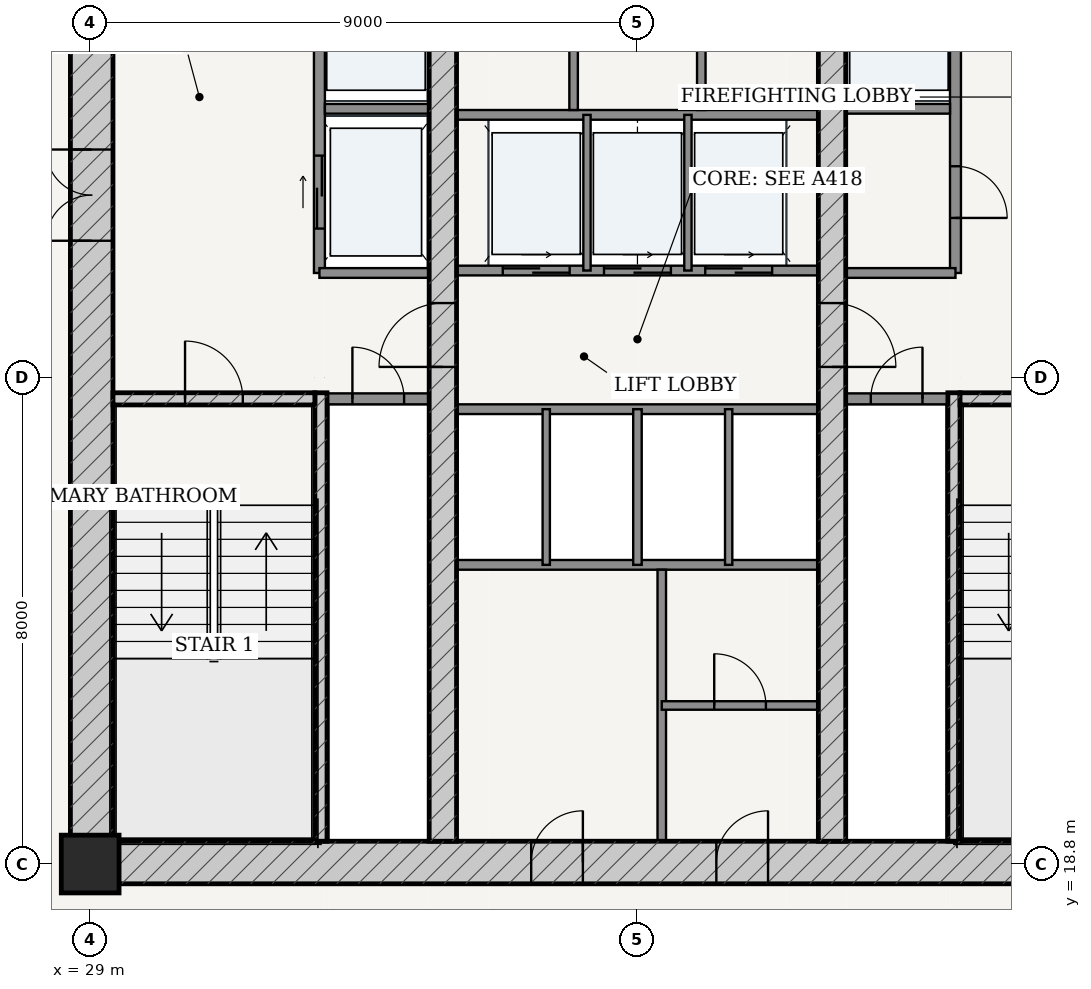
"""IFC4 building model, lengths in metres.
Left out: names, types, materials, properties, quantities, classifications, styles, units other than length and angle.
Written with IfcOpenShell. Run it as: python <this file> out.ifc"""

import sys

from ifc_helpers import new_model, si_unit, direction, frame, frame_2d, origin, origin_2d, place, context, subcontext, project, spatial, rectangle, extrude, source, transform, mapped, element, fill, save


model = new_model("IFC4")
c1 = context("Model", 3, precision=1e-05, world=origin(), true_north=direction((-0.2419218956, 0.970295726276)))
c2 = subcontext(c1, "Body", "Model", "MODEL_VIEW")
j1 = project(units=[si_unit("LENGTHUNIT", "METRE"), si_unit("PLANEANGLEUNIT", "RADIAN")], contexts=[c1])
p1 = place(None, origin())
s1 = spatial("IfcSite", under=j1, at=p1, CompositionType="ELEMENT")
p2 = place(p1, origin())
s2 = spatial("IfcBuilding", under=s1, at=p2, CompositionType="ELEMENT")
p3 = place(p2, frame((0.0, 0.0, 112.2)))
s3 = spatial("IfcBuildingStorey", under=s2, at=p3, CompositionType="ELEMENT", Elevation=112.2)
p4 = place(p3, frame((29.0, 18.8, 0.0), z_axis=(0.0, 0.0, 1.0), x_axis=(1.0, 0.0, 0.0)))
e1 = element("IfcColumn", 1, at=p4, inside=s3, PredefinedType="COLUMN", context=c2, shape_type="SweptSolid", body=[
    extrude(rectangle(XDim=0.95, YDim=0.95, at=origin_2d()), origin(), (0.0, 0.0, 1.0), 3.6),
])
p5 = place(p3, frame((28.675, 18.825, 0.0), z_axis=(0.0, 0.0, 1.0), x_axis=(1.0, 0.0, 0.0)))
e2 = element("IfcWall", 2, at=p5, inside=s3, PredefinedType="SHEAR", context=c2, shape_type="SweptSolid", body=[
    extrude(rectangle(XDim=18.65, YDim=0.7, at=frame_2d((9.325, 0.0))), origin(), (0.0, 0.0, 1.0), 3.325),
])
p6 = place(p5, frame((7.577, 0.0, 0.0)))
e3 = element("IfcOpeningElement", 3, at=p6, cuts=e2, PredefinedType="OPENING", context=c2, shape_type="SweptSolid", body=[
    extrude(rectangle(XDim=0.85, YDim=2.1, at=frame_2d((0.425, 1.05))), frame((0.0, 0.36, 0.0), z_axis=(0.0, -1.0, 0.0), x_axis=(1.0, 0.0, 0.0)), (0.0, 0.0, 1.0), 0.72),
])
p7 = place(p5, frame((10.623, 0.0, 0.0)))
e4 = element("IfcOpeningElement", 4, at=p7, cuts=e2, PredefinedType="OPENING", context=c2, shape_type="SweptSolid", body=[
    extrude(rectangle(XDim=0.85, YDim=2.1, at=frame_2d((0.425, 1.05))), frame((0.0, 0.36, 0.0), z_axis=(0.0, -1.0, 0.0), x_axis=(1.0, 0.0, 0.0)), (0.0, 0.0, 1.0), 0.72),
])
p8 = place(p3, frame((29.025, 19.175, 0.0), z_axis=(0.0, 0.0, 1.0), x_axis=(0.0, 1.0, 0.0)))
e5 = element("IfcWall", 5, at=p8, inside=s3, PredefinedType="SHEAR", context=c2, shape_type="SweptSolid", body=[
    extrude(rectangle(XDim=15.25, YDim=0.7, at=frame_2d((7.625, 0.0))), origin(), (0.0, 0.0, 1.0), 3.325),
])
p9 = place(p8, frame((9.875, 0.0, 0.0)))
e6 = element("IfcOpeningElement", 6, at=p9, cuts=e5, PredefinedType="OPENING", context=c2, shape_type="SweptSolid", body=[
    extrude(rectangle(XDim=1.5, YDim=2.2, at=frame_2d((0.75, 1.1))), frame((0.0, 0.36, 0.0), z_axis=(0.0, -1.0, 0.0), x_axis=(1.0, 0.0, 0.0)), (0.0, 0.0, 1.0), 0.72),
])
p10 = place(p3, frame((32.795, 19.175, 0.0), z_axis=(0.0, 0.0, 1.0), x_axis=(0.0, 1.0, 0.0)))
e7 = element("IfcWall", 7, at=p10, inside=s3, PredefinedType="SOLIDWALL", context=c2, shape_type="SweptSolid", body=[
    extrude(rectangle(XDim=7.375, YDim=0.2, at=frame_2d((3.688, 0.0))), origin(), (0.0, 0.0, 1.0), 3.325),
])
p11 = place(p3, frame((29.375, 26.45, 0.0), z_axis=(0.0, 0.0, 1.0), x_axis=(1.0, 0.0, 0.0)))
e8 = element("IfcWall", 8, at=p11, inside=s3, PredefinedType="SOLIDWALL", context=c2, shape_type="SweptSolid", body=[
    extrude(rectangle(XDim=3.32, YDim=0.2, at=frame_2d((1.66, 0.0))), origin(), (0.0, 0.0, 1.0), 3.325),
])
p12 = place(p11, frame((1.185, 0.0, 0.0)))
e9 = element("IfcOpeningElement", 9, at=p12, cuts=e8, PredefinedType="OPENING", context=c2, shape_type="SweptSolid", body=[
    extrude(rectangle(XDim=0.95, YDim=2.15, at=frame_2d((0.475, 1.075))), frame((0.0, 0.11, 0.0), z_axis=(0.0, -1.0, 0.0), x_axis=(1.0, 0.0, 0.0)), (0.0, 0.0, 1.0), 0.22),
])
p13 = place(p3, frame((43.205, 19.175, 0.0), z_axis=(0.0, 0.0, 1.0), x_axis=(0.0, 1.0, 0.0)))
e10 = element("IfcWall", 10, at=p13, inside=s3, PredefinedType="SOLIDWALL", context=c2, shape_type="SweptSolid", body=[
    extrude(rectangle(XDim=7.375, YDim=0.2, at=frame_2d((3.688, 0.0))), origin(), (0.0, 0.0, 1.0), 3.325),
])
p14 = place(p3, frame((43.305, 26.45, 0.0), z_axis=(0.0, 0.0, 1.0), x_axis=(1.0, 0.0, 0.0)))
e11 = element("IfcWall", 11, at=p14, inside=s3, PredefinedType="SOLIDWALL", context=c2, shape_type="SweptSolid", body=[
    extrude(rectangle(XDim=3.32, YDim=0.2, at=frame_2d((1.66, 0.0))), origin(), (0.0, 0.0, 1.0), 3.325),
])
p15 = place(p14, frame((1.185, 0.0, 0.0)))
e12 = element("IfcOpeningElement", 12, at=p15, cuts=e11, PredefinedType="OPENING", context=c2, shape_type="SweptSolid", body=[
    extrude(rectangle(XDim=0.95, YDim=2.15, at=frame_2d((0.475, 1.075))), frame((0.0, 0.11, 0.0), z_axis=(0.0, -1.0, 0.0), x_axis=(1.0, 0.0, 0.0)), (0.0, 0.0, 1.0), 0.22),
])
p16 = place(p3, frame((34.8, 19.175, 0.0), z_axis=(0.0, 0.0, 1.0), x_axis=(0.0, 1.0, 0.0)))
e13 = element("IfcWall", 13, at=p16, inside=s3, PredefinedType="SHEAR", context=c2, shape_type="SweptSolid", body=[
    extrude(rectangle(XDim=15.25, YDim=0.45, at=frame_2d((7.625, 0.0))), origin(), (0.0, 0.0, 1.0), 3.325),
])
p17 = place(p16, frame((7.8, 0.0, 0.0)))
e14 = element("IfcOpeningElement", 14, at=p17, cuts=e13, PredefinedType="OPENING", context=c2, shape_type="SweptSolid", body=[
    extrude(rectangle(XDim=1.05, YDim=2.15, at=frame_2d((0.525, 1.075))), frame((0.0, 0.235, 0.0), z_axis=(0.0, -1.0, 0.0), x_axis=(1.0, 0.0, 0.0)), (0.0, 0.0, 1.0), 0.47),
])
p18 = place(p3, frame((41.2, 19.175, 0.0), z_axis=(0.0, 0.0, 1.0), x_axis=(0.0, 1.0, 0.0)))
e15 = element("IfcWall", 15, at=p18, inside=s3, PredefinedType="SHEAR", context=c2, shape_type="SweptSolid", body=[
    extrude(rectangle(XDim=15.25, YDim=0.45, at=frame_2d((7.625, 0.0))), origin(), (0.0, 0.0, 1.0), 3.325),
])
p19 = place(p18, frame((7.8, 0.0, 0.0)))
e16 = element("IfcOpeningElement", 16, at=p19, cuts=e15, PredefinedType="OPENING", context=c2, shape_type="SweptSolid", body=[
    extrude(rectangle(XDim=1.05, YDim=2.15, at=frame_2d((0.525, 1.075))), frame((0.0, 0.235, 0.0), z_axis=(0.0, -1.0, 0.0), x_axis=(1.0, 0.0, 0.0)), (0.0, 0.0, 1.0), 0.47),
])
p20 = place(p3, frame((32.9, 26.45, 0.0), z_axis=(0.0, 0.0, 1.0), x_axis=(1.0, 0.0, 0.0)))
e17 = element("IfcWall", 17, at=p20, inside=s3, PredefinedType="PARTITIONING", context=c2, shape_type="SweptSolid", body=[
    extrude(rectangle(XDim=1.675, YDim=0.18, at=frame_2d((0.837, 0.0))), origin(), (0.0, 0.0, 1.0), 3.325),
])
p21 = place(p20, frame((0.413, 0.0, 0.0)))
e18 = element("IfcOpeningElement", 18, at=p21, cuts=e17, PredefinedType="OPENING", context=c2, shape_type="SweptSolid", body=[
    extrude(rectangle(XDim=0.85, YDim=2.1, at=frame_2d((0.425, 1.05))), frame((0.0, 0.1, 0.0), z_axis=(0.0, -1.0, 0.0), x_axis=(1.0, 0.0, 0.0)), (0.0, 0.0, 1.0), 0.2),
])
p22 = place(p3, frame((41.425, 26.45, 0.0), z_axis=(0.0, 0.0, 1.0), x_axis=(1.0, 0.0, 0.0)))
e19 = element("IfcWall", 19, at=p22, inside=s3, PredefinedType="PARTITIONING", context=c2, shape_type="SweptSolid", body=[
    extrude(rectangle(XDim=1.675, YDim=0.18, at=frame_2d((0.837, 0.0))), origin(), (0.0, 0.0, 1.0), 3.325),
])
p23 = place(p22, frame((0.413, 0.0, 0.0)))
e20 = element("IfcOpeningElement", 20, at=p23, cuts=e19, PredefinedType="OPENING", context=c2, shape_type="SweptSolid", body=[
    extrude(rectangle(XDim=0.85, YDim=2.1, at=frame_2d((0.425, 1.05))), frame((0.0, 0.1, 0.0), z_axis=(0.0, -1.0, 0.0), x_axis=(1.0, 0.0, 0.0)), (0.0, 0.0, 1.0), 0.2),
])
p24 = place(p3, frame((32.77, 28.52, 0.0), z_axis=(0.0, 0.0, 1.0), x_axis=(0.0, 1.0, 0.0)))
e21 = element("IfcWall", 21, at=p24, inside=s3, PredefinedType="PARTITIONING", context=c2, shape_type="SweptSolid", body=[
    extrude(rectangle(XDim=5.905, YDim=0.18, at=frame_2d((2.953, 0.0))), origin(), (0.0, 0.0, 1.0), 3.325),
])
p25 = place(p24, frame((3.655, 0.0, 0.0)))
e22 = element("IfcOpeningElement", 22, at=p25, cuts=e21, PredefinedType="OPENING", context=c2, shape_type="SweptSolid", body=[
    extrude(rectangle(XDim=1.15, YDim=2.2, at=frame_2d((0.575, 1.1))), frame((0.0, 0.1, 0.0), z_axis=(0.0, -1.0, 0.0), x_axis=(1.0, 0.0, 0.0)), (0.0, 0.0, 1.0), 0.2),
])
p26 = place(p24, frame((0.73, 0.0, 0.0)))
e23 = element("IfcOpeningElement", 23, at=p26, cuts=e21, PredefinedType="OPENING", context=c2, shape_type="SweptSolid", body=[
    extrude(rectangle(XDim=1.2, YDim=2.25, at=frame_2d((0.6, 1.125))), frame((0.0, 0.1, 0.0), z_axis=(0.0, -1.0, 0.0), x_axis=(1.0, 0.0, 0.0)), (0.0, 0.0, 1.0), 0.2),
])
p27 = place(p3, frame((32.86, 31.22, 0.0), z_axis=(0.0, 0.0, 1.0), x_axis=(1.0, 0.0, 0.0)))
e24 = element("IfcWall", 24, at=p27, inside=s3, PredefinedType="PARTITIONING", context=c2, shape_type="SweptSolid", body=[
    extrude(rectangle(XDim=1.715, YDim=0.16, at=frame_2d((0.857, 0.0))), origin(), (0.0, 0.0, 1.0), 3.325),
])
p28 = place(p3, frame((32.77, 28.52, 0.0), z_axis=(0.0, 0.0, 1.0), x_axis=(1.0, 0.0, 0.0)))
e25 = element("IfcWall", 25, at=p28, inside=s3, PredefinedType="PARTITIONING", context=c2, shape_type="SweptSolid", body=[
    extrude(rectangle(XDim=1.805, YDim=0.16, at=frame_2d((0.902, 0.0))), origin(), (0.0, 0.0, 1.0), 3.325),
])
p29 = place(p3, frame((43.23, 28.52, 0.0), z_axis=(0.0, 0.0, 1.0), x_axis=(0.0, 1.0, 0.0)))
e26 = element("IfcWall", 26, at=p29, inside=s3, PredefinedType="PARTITIONING", context=c2, shape_type="SweptSolid", body=[
    extrude(rectangle(XDim=5.905, YDim=0.18, at=frame_2d((2.953, 0.0))), origin(), (0.0, 0.0, 1.0), 3.325),
])
p30 = place(p29, frame((0.905, 0.0, 0.0)))
e27 = element("IfcOpeningElement", 27, at=p30, cuts=e26, PredefinedType="OPENING", context=c2, shape_type="SweptSolid", body=[
    extrude(rectangle(XDim=0.85, YDim=2.1, at=frame_2d((0.425, 1.05))), frame((0.0, 0.1, 0.0), z_axis=(0.0, -1.0, 0.0), x_axis=(1.0, 0.0, 0.0)), (0.0, 0.0, 1.0), 0.2),
])
p31 = place(p29, frame((3.655, 0.0, 0.0)))
e28 = element("IfcOpeningElement", 28, at=p31, cuts=e26, PredefinedType="OPENING", context=c2, shape_type="SweptSolid", body=[
    extrude(rectangle(XDim=1.15, YDim=2.2, at=frame_2d((0.575, 1.1))), frame((0.0, 0.1, 0.0), z_axis=(0.0, -1.0, 0.0), x_axis=(1.0, 0.0, 0.0)), (0.0, 0.0, 1.0), 0.2),
])
p32 = place(p3, frame((41.425, 31.22, 0.0), z_axis=(0.0, 0.0, 1.0), x_axis=(1.0, 0.0, 0.0)))
e29 = element("IfcWall", 29, at=p32, inside=s3, PredefinedType="PARTITIONING", context=c2, shape_type="SweptSolid", body=[
    extrude(rectangle(XDim=1.715, YDim=0.16, at=frame_2d((0.857, 0.0))), origin(), (0.0, 0.0, 1.0), 3.325),
])
p33 = place(p3, frame((41.425, 28.52, 0.0), z_axis=(0.0, 0.0, 1.0), x_axis=(1.0, 0.0, 0.0)))
e30 = element("IfcWall", 30, at=p33, inside=s3, PredefinedType="PARTITIONING", context=c2, shape_type="SweptSolid", body=[
    extrude(rectangle(XDim=1.805, YDim=0.16, at=frame_2d((0.902, 0.0))), origin(), (0.0, 0.0, 1.0), 3.325),
])
p34 = place(p3, frame((35.025, 28.56, 0.0), z_axis=(0.0, 0.0, 1.0), x_axis=(1.0, 0.0, 0.0)))
e31 = element("IfcWall", 31, at=p34, inside=s3, PredefinedType="PARTITIONING", context=c2, shape_type="SweptSolid", body=[
    extrude(rectangle(XDim=5.95, YDim=0.16, at=frame_2d((2.975, 0.0))), origin(), (0.0, 0.0, 1.0), 3.325),
])
p35 = place(p34, frame((0.76, 0.0, 0.0)))
e32 = element("IfcOpeningElement", 32, at=p35, cuts=e31, PredefinedType="OPENING", context=c2, shape_type="SweptSolid", body=[
    extrude(rectangle(XDim=1.1, YDim=2.2, at=frame_2d((0.55, 1.1))), frame((0.0, 0.09, 0.0), z_axis=(0.0, -1.0, 0.0), x_axis=(1.0, 0.0, 0.0)), (0.0, 0.0, 1.0), 0.18),
])
p36 = place(p34, frame((2.425, 0.0, 0.0)))
e33 = element("IfcOpeningElement", 33, at=p36, cuts=e31, PredefinedType="OPENING", context=c2, shape_type="SweptSolid", body=[
    extrude(rectangle(XDim=1.1, YDim=2.2, at=frame_2d((0.55, 1.1))), frame((0.0, 0.09, 0.0), z_axis=(0.0, -1.0, 0.0), x_axis=(1.0, 0.0, 0.0)), (0.0, 0.0, 1.0), 0.18),
])
p37 = place(p34, frame((4.09, 0.0, 0.0)))
e34 = element("IfcOpeningElement", 34, at=p37, cuts=e31, PredefinedType="OPENING", context=c2, shape_type="SweptSolid", body=[
    extrude(rectangle(XDim=1.1, YDim=2.2, at=frame_2d((0.55, 1.1))), frame((0.0, 0.09, 0.0), z_axis=(0.0, -1.0, 0.0), x_axis=(1.0, 0.0, 0.0)), (0.0, 0.0, 1.0), 0.18),
])
p38 = place(p3, frame((35.025, 31.12, 0.0), z_axis=(0.0, 0.0, 1.0), x_axis=(1.0, 0.0, 0.0)))
e35 = element("IfcWall", 35, at=p38, inside=s3, PredefinedType="PARTITIONING", context=c2, shape_type="SweptSolid", body=[
    extrude(rectangle(XDim=5.95, YDim=0.16, at=frame_2d((2.975, 0.0))), origin(), (0.0, 0.0, 1.0), 3.325),
])
for number, where, z_axis, x_axis in (
    (36, (37.17, 28.56, 0.0), (0.0, 0.0, 1.0), (0.0, 1.0, 0.0)),
    (37, (38.83, 28.56, 0.0), (0.0, 0.0, 1.0), (0.0, 1.0, 0.0)),
):
    element("IfcWall", number, at=place(p3, frame(where, z_axis=z_axis, x_axis=x_axis)), inside=s3, PredefinedType="PARTITIONING", context=c2, shape_type="SweptSolid", body=[
        extrude(rectangle(XDim=2.56, YDim=0.12, at=frame_2d((1.28, 0.0))), origin(), (0.0, 0.0, 1.0), 3.325),
    ])
for number, where, z_axis, x_axis in (
    (38, (36.95, 31.2, 0.0), (0.0, 0.0, 1.0), (0.0, 1.0, 0.0)),
    (39, (39.05, 31.2, 0.0), (0.0, 0.0, 1.0), (0.0, 1.0, 0.0)),
):
    element("IfcWall", number, at=place(p3, frame(where, z_axis=z_axis, x_axis=x_axis)), inside=s3, PredefinedType="PARTITIONING", context=c2, shape_type="SweptSolid", body=[
        extrude(rectangle(XDim=3.225, YDim=0.14, at=frame_2d((1.613, 0.0))), origin(), (0.0, 0.0, 1.0), 3.325),
    ])
for number, where, z_axis, x_axis in (
    (40, (35.025, 26.28, 0.0), (0.0, 0.0, 1.0), (1.0, 0.0, 0.0)),
    (41, (35.025, 23.72, 0.0), (0.0, 0.0, 1.0), (1.0, 0.0, 0.0)),
):
    element("IfcWall", number, at=place(p3, frame(where, z_axis=z_axis, x_axis=x_axis)), inside=s3, PredefinedType="PARTITIONING", context=c2, shape_type="SweptSolid", body=[
        extrude(rectangle(XDim=5.95, YDim=0.16, at=frame_2d((2.975, 0.0))), origin(), (0.0, 0.0, 1.0), 3.325),
    ])
p39 = place(p3, frame((36.5, 23.72, 0.0), z_axis=(0.0, 0.0, 1.0), x_axis=(0.0, 1.0, 0.0)))
e42 = element("IfcWall", 42, at=p39, inside=s3, PredefinedType="PARTITIONING", context=c2, shape_type="SweptSolid", body=[
    extrude(rectangle(XDim=2.56, YDim=0.12, at=frame_2d((1.28, 0.0))), origin(), (0.0, 0.0, 1.0), 3.325),
])
p40 = place(p3, frame((38.0, 23.72, 0.0), z_axis=(0.0, 0.0, 1.0), x_axis=(0.0, 1.0, 0.0)))
e43 = element("IfcWall", 43, at=p40, inside=s3, PredefinedType="PARTITIONING", context=c2, shape_type="SweptSolid", body=[
    extrude(rectangle(XDim=2.56, YDim=0.14, at=frame_2d((1.28, 0.0))), origin(), (0.0, 0.0, 1.0), 3.325),
])
p41 = place(p3, frame((39.5, 23.72, 0.0), z_axis=(0.0, 0.0, 1.0), x_axis=(0.0, 1.0, 0.0)))
e44 = element("IfcWall", 44, at=p41, inside=s3, PredefinedType="PARTITIONING", context=c2, shape_type="SweptSolid", body=[
    extrude(rectangle(XDim=2.56, YDim=0.12, at=frame_2d((1.28, 0.0))), origin(), (0.0, 0.0, 1.0), 3.325),
])
p42 = place(p3, frame((38.4, 19.175, 0.0), z_axis=(0.0, 0.0, 1.0), x_axis=(0.0, 1.0, 0.0)))
e45 = element("IfcWall", 45, at=p42, inside=s3, PredefinedType="PARTITIONING", context=c2, shape_type="SweptSolid", body=[
    extrude(rectangle(XDim=4.465, YDim=0.14, at=frame_2d((2.232, 0.0))), origin(), (0.0, 0.0, 1.0), 3.325),
])
p43 = place(p3, frame((38.4, 21.407, 0.0), z_axis=(0.0, 0.0, 1.0), x_axis=(1.0, 0.0, 0.0)))
e46 = element("IfcWall", 46, at=p43, inside=s3, PredefinedType="PARTITIONING", context=c2, shape_type="SweptSolid", body=[
    extrude(rectangle(XDim=2.575, YDim=0.14, at=frame_2d((1.288, 0.0))), origin(), (0.0, 0.0, 1.0), 3.325),
])
p44 = place(p43, frame((0.863, 0.0, 0.0)))
e47 = element("IfcOpeningElement", 47, at=p44, cuts=e46, PredefinedType="OPENING", context=c2, shape_type="SweptSolid", body=[
    extrude(rectangle(XDim=0.85, YDim=2.1, at=frame_2d((0.425, 1.05))), frame((0.0, 0.08, 0.0), z_axis=(0.0, -1.0, 0.0), x_axis=(1.0, 0.0, 0.0)), (0.0, 0.0, 1.0), 0.16),
])
m1 = source(origin(), c2, "Body", "SweptSolid", [
    extrude(rectangle(XDim=1.5, YDim=2.2, at=frame_2d((0.75, 1.1))), frame((0.0, 0.025, 0.0), z_axis=(0.0, -1.0, 0.0), x_axis=(1.0, 0.0, 0.0)), (0.0, 0.0, 1.0), 0.05),
])
p45 = place(p9, origin())
e48 = element("IfcDoor", 48, at=p45, inside=s3, OperationType="DOUBLE_DOOR_SINGLE_SWING", PredefinedType="DOOR", context=c2, shape_type="MappedRepresentation", body=[
    mapped(m1, transform((0.0, 0.0, 0.0), scale=1.0)),
])
fill(e6, e48)
m2 = source(origin(), c2, "Body", "SweptSolid", [
    extrude(rectangle(XDim=1.05, YDim=2.15, at=frame_2d((0.525, 1.075))), frame((0.0, 0.025, 0.0), z_axis=(0.0, -1.0, 0.0), x_axis=(1.0, 0.0, 0.0)), (0.0, 0.0, 1.0), 0.05),
])
p46 = place(p17, origin())
e49 = element("IfcDoor", 49, at=p46, inside=s3, OperationType="SINGLE_SWING_LEFT", PredefinedType="DOOR", context=c2, shape_type="MappedRepresentation", body=[
    mapped(m2, transform((0.0, 0.0, 0.0), scale=1.0)),
])
fill(e14, e49)
p47 = place(p19, frame((1.05, 0.0, 0.0), z_axis=(0.0, 0.0, 1.0), x_axis=(-1.0, 0.0, 0.0)))
e50 = element("IfcDoor", 50, at=p47, inside=s3, OperationType="SINGLE_SWING_RIGHT", PredefinedType="DOOR", context=c2, shape_type="MappedRepresentation", body=[
    mapped(m2, transform((0.0, 0.0, 0.0), scale=1.0)),
])
fill(e16, e50)
m3 = source(origin(), c2, "Body", "SweptSolid", [
    extrude(rectangle(XDim=0.95, YDim=2.15, at=frame_2d((0.475, 1.075))), frame((0.0, 0.025, 0.0), z_axis=(0.0, -1.0, 0.0), x_axis=(1.0, 0.0, 0.0)), (0.0, 0.0, 1.0), 0.05),
])
p48 = place(p12, origin())
e51 = element("IfcDoor", 51, at=p48, inside=s3, OperationType="SINGLE_SWING_LEFT", PredefinedType="DOOR", context=c2, shape_type="MappedRepresentation", body=[
    mapped(m3, transform((0.0, 0.0, 0.0), scale=1.0)),
])
fill(e9, e51)
m4 = source(origin(), c2, "Body", "SweptSolid", [
    extrude(rectangle(XDim=0.85, YDim=2.1, at=frame_2d((0.425, 1.05))), frame((0.0, 0.025, 0.0), z_axis=(0.0, -1.0, 0.0), x_axis=(1.0, 0.0, 0.0)), (0.0, 0.0, 1.0), 0.05),
])
p49 = place(p21, origin())
e52 = element("IfcDoor", 52, at=p49, inside=s3, OperationType="SINGLE_SWING_LEFT", PredefinedType="DOOR", context=c2, shape_type="MappedRepresentation", body=[
    mapped(m4, transform((0.0, 0.0, 0.0), scale=1.0)),
])
fill(e18, e52)
p50 = place(p23, origin())
e53 = element("IfcDoor", 53, at=p50, inside=s3, OperationType="SINGLE_SWING_RIGHT", PredefinedType="DOOR", context=c2, shape_type="MappedRepresentation", body=[
    mapped(m4, transform((0.0, 0.0, 0.0), scale=1.0)),
])
fill(e20, e53)
p51 = place(p30, frame((0.85, 0.0, 0.0), z_axis=(0.0, 0.0, 1.0), x_axis=(-1.0, 0.0, 0.0)))
e54 = element("IfcDoor", 54, at=p51, inside=s3, OperationType="SINGLE_SWING_RIGHT", PredefinedType="DOOR", context=c2, shape_type="MappedRepresentation", body=[
    mapped(m4, transform((0.0, 0.0, 0.0), scale=1.0)),
])
fill(e27, e54)
p52 = place(p6, origin())
e55 = element("IfcDoor", 55, at=p52, inside=s3, OperationType="SINGLE_SWING_RIGHT", PredefinedType="DOOR", context=c2, shape_type="MappedRepresentation", body=[
    mapped(m4, transform((0.0, 0.0, 0.0), scale=1.0)),
])
fill(e3, e55)
p53 = place(p7, origin())
e56 = element("IfcDoor", 56, at=p53, inside=s3, OperationType="SINGLE_SWING_RIGHT", PredefinedType="DOOR", context=c2, shape_type="MappedRepresentation", body=[
    mapped(m4, transform((0.0, 0.0, 0.0), scale=1.0)),
])
fill(e4, e56)
p54 = place(p44, origin())
e57 = element("IfcDoor", 57, at=p54, inside=s3, OperationType="SINGLE_SWING_LEFT", PredefinedType="DOOR", context=c2, shape_type="MappedRepresentation", body=[
    mapped(m4, transform((0.0, 0.0, 0.0), scale=1.0)),
])
fill(e47, e57)
m5 = source(origin(), c2, "Body", "SweptSolid", [
    extrude(rectangle(XDim=1.2, YDim=2.25, at=frame_2d((0.6, 1.125))), frame((0.0, 0.025, 0.0), z_axis=(0.0, -1.0, 0.0), x_axis=(1.0, 0.0, 0.0)), (0.0, 0.0, 1.0), 0.05),
])
p55 = place(p26, origin())
e58 = element("IfcDoor", 58, at=p55, inside=s3, OperationType="DOUBLE_DOOR_SLIDING", PredefinedType="DOOR", context=c2, shape_type="MappedRepresentation", body=[
    mapped(m5, transform((0.0, 0.0, 0.0), scale=1.0)),
])
fill(e23, e58)
m6 = source(origin(), c2, "Body", "SweptSolid", [
    extrude(rectangle(XDim=1.1, YDim=2.2, at=frame_2d((0.55, 1.1))), frame((0.0, 0.025, 0.0), z_axis=(0.0, -1.0, 0.0), x_axis=(1.0, 0.0, 0.0)), (0.0, 0.0, 1.0), 0.05),
])
p56 = place(p35, origin())
e59 = element("IfcDoor", 59, at=p56, inside=s3, OperationType="DOUBLE_DOOR_SLIDING", PredefinedType="DOOR", context=c2, shape_type="MappedRepresentation", body=[
    mapped(m6, transform((0.0, 0.0, 0.0), scale=1.0)),
])
fill(e32, e59)
p57 = place(p36, origin())
e60 = element("IfcDoor", 60, at=p57, inside=s3, OperationType="DOUBLE_DOOR_SLIDING", PredefinedType="DOOR", context=c2, shape_type="MappedRepresentation", body=[
    mapped(m6, transform((0.0, 0.0, 0.0), scale=1.0)),
])
fill(e33, e60)
p58 = place(p37, origin())
e61 = element("IfcDoor", 61, at=p58, inside=s3, OperationType="DOUBLE_DOOR_SLIDING", PredefinedType="DOOR", context=c2, shape_type="MappedRepresentation", body=[
    mapped(m6, transform((0.0, 0.0, 0.0), scale=1.0)),
])
fill(e34, e61)
save(model, sys.argv[1])
